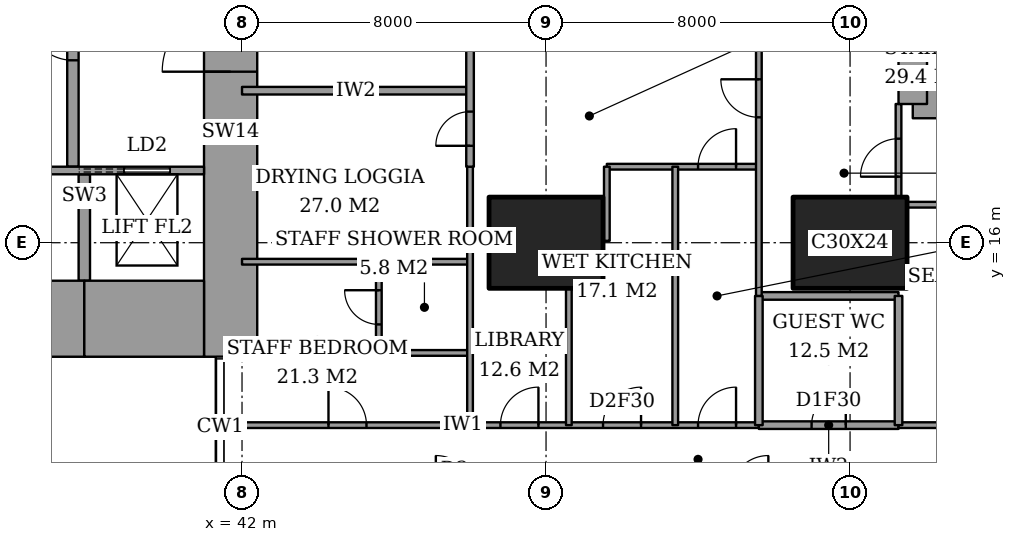
"""IFC4 building model, lengths in metres.
Left out: names, types, materials, properties, quantities, classifications, styles, units other than length and angle.
Written with IfcOpenShell. Run it as: python <this file> out.ifc"""

import sys

from ifc_helpers import new_model, si_unit, direction, frame, frame_2d, origin, origin_2d, place, context, subcontext, project, spatial, rectangle, extrude, element, fill, save


model = new_model("IFC4")
c1 = context("Model", 3, precision=1e-05, world=origin(), true_north=direction((0.0, 1.0)))
c2 = subcontext(c1, "Body", "Model", "MODEL_VIEW")
j1 = project(units=[si_unit("LENGTHUNIT", "METRE"), si_unit("PLANEANGLEUNIT", "RADIAN")], contexts=[c1])
p1 = place(None, origin())
s1 = spatial("IfcSite", under=j1, at=p1, CompositionType="ELEMENT")
p2 = place(p1, origin())
s2 = spatial("IfcBuilding", under=s1, at=p2, CompositionType="ELEMENT")
p3 = place(p2, frame((0.0, 0.0, 189.4)))
s3 = spatial("IfcBuildingStorey", under=s2, at=p3, CompositionType="ELEMENT", Elevation=189.4)
for number, where, z_axis, x_axis in (
    (1, (50.0, 16.0, 0.0), (0.0, 0.0, 1.0), (1.0, 0.0, 0.0)),
    (2, (58.0, 16.0, 0.0), (0.0, 0.0, 1.0), (1.0, 0.0, 0.0)),
):
    element("IfcColumn", number, at=place(p3, frame(where, z_axis=z_axis, x_axis=x_axis)), inside=s3, PredefinedType="COLUMN", context=c2, shape_type="SweptSolid", body=[
        extrude(rectangle(XDim=3.0, YDim=2.4, at=origin_2d()), origin(), (0.0, 0.0, 1.0), 3.6),
    ])
p4 = place(p3, frame((28.15, 14.0, 0.0), z_axis=(0.0, 0.0, 1.0), x_axis=(1.0, 0.0, 0.0)))
e3 = element("IfcWall", 3, at=p4, inside=s3, PredefinedType="SHEAR", context=c2, shape_type="SweptSolid", body=[
    extrude(rectangle(XDim=9.7, YDim=2.0, at=frame_2d((4.85, 0.0))), origin(), (0.0, 0.0, 1.0), 3.6),
])
p5 = place(p3, frame((37.85, 14.0, 0.0), z_axis=(0.0, 0.0, 1.0), x_axis=(1.0, 0.0, 0.0)))
e4 = element("IfcWall", 4, at=p5, inside=s3, PredefinedType="SHEAR", context=c2, shape_type="SweptSolid", body=[
    extrude(rectangle(XDim=3.15, YDim=2.0, at=frame_2d((1.575, 0.0))), origin(), (0.0, 0.0, 1.0), 3.6),
])
p6 = place(p3, frame((41.7, 13.0, 0.0), z_axis=(0.0, 0.0, 1.0), x_axis=(0.0, 1.0, 0.0)))
e5 = element("IfcWall", 5, at=p6, inside=s3, PredefinedType="SHEAR", context=c2, shape_type="SweptSolid", body=[
    extrude(rectangle(XDim=11.85, YDim=1.4, at=frame_2d((5.925, 0.0))), origin(), (0.0, 0.0, 1.0), 3.6),
])
p7 = place(p6, frame((7.5, 0.0, 0.0)))
e6 = element("IfcOpeningElement", 6, at=p7, cuts=e5, PredefinedType="OPENING", context=c2, shape_type="SweptSolid", body=[
    extrude(rectangle(XDim=1.8, YDim=2.4, at=frame_2d((0.9, 1.2))), frame((0.0, 0.71, 0.0), z_axis=(0.0, -1.0, 0.0), x_axis=(1.0, 0.0, 0.0)), (0.0, 0.0, 1.0), 1.42),
])
p8 = place(p3, frame((37.55, 18.0, 0.0), z_axis=(0.0, 0.0, 1.0), x_axis=(0.0, 1.0, 0.0)))
e7 = element("IfcWall", 7, at=p8, inside=s3, PredefinedType="PARTITIONING", context=c2, shape_type="SweptSolid", body=[
    extrude(rectangle(XDim=6.7, YDim=0.3, at=frame_2d((3.35, 0.0))), origin(), (0.0, 0.0, 1.0), 3.6),
])
p9 = place(p8, frame((2.8, 0.0, 0.0)))
e8 = element("IfcOpeningElement", 8, at=p9, cuts=e7, PredefinedType="OPENING", context=c2, shape_type="SweptSolid", body=[
    extrude(rectangle(XDim=1.2, YDim=2.1, at=frame_2d((0.6, 1.05))), frame((0.0, 0.16, 0.0), z_axis=(0.0, -1.0, 0.0), x_axis=(1.0, 0.0, 0.0)), (0.0, 0.0, 1.0), 0.32),
])
p10 = place(p3, frame((59.65, 19.65, 0.0), z_axis=(0.0, 0.0, 1.0), x_axis=(1.0, 0.0, 0.0)))
e9 = element("IfcWall", 9, at=p10, inside=s3, PredefinedType="SHEAR", context=c2, shape_type="SweptSolid", body=[
    extrude(rectangle(XDim=4.45, YDim=0.75, at=frame_2d((2.225, 0.0))), origin(), (0.0, 0.0, 1.0), 3.6),
])
p11 = place(p3, frame((59.65, 28.35, 0.0), z_axis=(0.0, 0.0, 1.0), x_axis=(0.0, -1.0, 0.0)))
e10 = element("IfcWall", 10, at=p11, inside=s3, PredefinedType="SHEAR", context=c2, shape_type="SweptSolid", body=[
    extrude(rectangle(XDim=8.7, YDim=0.75, at=frame_2d((4.35, 0.0))), origin(), (0.0, 0.0, 1.0), 3.6),
])
p12 = place(p11, frame((0.975, 0.0, 0.0)))
e11 = element("IfcOpeningElement", 11, at=p12, cuts=e10, PredefinedType="OPENING", context=c2, shape_type="SweptSolid", body=[
    extrude(rectangle(XDim=1.0, YDim=2.1, at=frame_2d((0.5, 1.05))), frame((0.0, 0.385, 0.0), z_axis=(0.0, -1.0, 0.0), x_axis=(1.0, 0.0, 0.0)), (0.0, 0.0, 1.0), 0.77),
])
p13 = place(p3, frame((55.6, 11.2, 0.0), z_axis=(0.0, 0.0, 1.0), x_axis=(1.0, 0.0, 0.0)))
e12 = element("IfcWall", 12, at=p13, inside=s3, PredefinedType="PARTITIONING", context=c2, shape_type="SweptSolid", body=[
    extrude(rectangle(XDim=3.675, YDim=0.2, at=frame_2d((1.837, 0.0))), origin(), (0.0, 0.0, 1.0), 3.35),
])
p14 = place(p13, frame((1.387, 0.0, 0.0)))
e13 = element("IfcOpeningElement", 13, at=p14, cuts=e12, PredefinedType="OPENING", context=c2, shape_type="SweptSolid", body=[
    extrude(rectangle(XDim=0.9, YDim=2.1, at=frame_2d((0.45, 1.05))), frame((0.0, 0.11, 0.0), z_axis=(0.0, -1.0, 0.0), x_axis=(1.0, 0.0, 0.0)), (0.0, 0.0, 1.0), 0.22),
])
p15 = place(p3, frame((41.439, 11.2, 0.0), z_axis=(0.0, 0.0, 1.0), x_axis=(1.0, 0.0, 0.0)))
e14 = element("IfcWall", 14, at=p15, inside=s3, PredefinedType="PARTITIONING", context=c2, shape_type="SweptSolid", body=[
    extrude(rectangle(XDim=14.161, YDim=0.15, at=frame_2d((7.081, 0.0))), origin(), (0.0, 0.0, 1.0), 3.35),
])
p16 = place(p15, frame((12.561, 0.0, 0.0)))
e15 = element("IfcOpeningElement", 15, at=p16, cuts=e14, PredefinedType="OPENING", context=c2, shape_type="SweptSolid", body=[
    extrude(rectangle(XDim=1.0, YDim=2.1, at=frame_2d((0.5, 1.05))), frame((0.0, 0.085, 0.0), z_axis=(0.0, -1.0, 0.0), x_axis=(1.0, 0.0, 0.0)), (0.0, 0.0, 1.0), 0.17),
])
p17 = place(p15, frame((10.061, 0.0, 0.0)))
e16 = element("IfcOpeningElement", 16, at=p17, cuts=e14, PredefinedType="OPENING", context=c2, shape_type="SweptSolid", body=[
    extrude(rectangle(XDim=1.0, YDim=2.1, at=frame_2d((0.5, 1.05))), frame((0.0, 0.085, 0.0), z_axis=(0.0, -1.0, 0.0), x_axis=(1.0, 0.0, 0.0)), (0.0, 0.0, 1.0), 0.17),
])
p18 = place(p15, frame((7.361, 0.0, 0.0)))
e17 = element("IfcOpeningElement", 17, at=p18, cuts=e14, PredefinedType="OPENING", context=c2, shape_type="SweptSolid", body=[
    extrude(rectangle(XDim=1.0, YDim=2.1, at=frame_2d((0.5, 1.05))), frame((0.0, 0.085, 0.0), z_axis=(0.0, -1.0, 0.0), x_axis=(1.0, 0.0, 0.0)), (0.0, 0.0, 1.0), 0.17),
])
p19 = place(p15, frame((2.836, 0.0, 0.0)))
e18 = element("IfcOpeningElement", 18, at=p19, cuts=e14, PredefinedType="OPENING", context=c2, shape_type="SweptSolid", body=[
    extrude(rectangle(XDim=1.0, YDim=2.1, at=frame_2d((0.5, 1.05))), frame((0.0, 0.085, 0.0), z_axis=(0.0, -1.0, 0.0), x_axis=(1.0, 0.0, 0.0)), (0.0, 0.0, 1.0), 0.17),
])
p20 = place(p3, frame((59.275, 11.2, 0.0), z_axis=(0.0, 0.0, 1.0), x_axis=(1.0, 0.0, 0.0)))
e19 = element("IfcWall", 19, at=p20, inside=s3, PredefinedType="PARTITIONING", context=c2, shape_type="SweptSolid", body=[
    extrude(rectangle(XDim=7.175, YDim=0.15, at=frame_2d((3.587, 0.0))), origin(), (0.0, 0.0, 1.0), 3.35),
])
p21 = place(p20, frame((3.087, 0.0, 0.0)))
e20 = element("IfcOpeningElement", 20, at=p21, cuts=e19, PredefinedType="OPENING", context=c2, shape_type="SweptSolid", body=[
    extrude(rectangle(XDim=1.0, YDim=2.1, at=frame_2d((0.5, 1.05))), frame((0.0, 0.085, 0.0), z_axis=(0.0, -1.0, 0.0), x_axis=(1.0, 0.0, 0.0)), (0.0, 0.0, 1.0), 0.17),
])
p22 = place(p3, frame((45.6, 13.1, 0.0), z_axis=(0.0, 0.0, 1.0), x_axis=(1.0, 0.0, 0.0)))
e21 = element("IfcWall", 21, at=p22, inside=s3, PredefinedType="PARTITIONING", context=c2, shape_type="SweptSolid", body=[
    extrude(rectangle(XDim=2.4, YDim=0.15, at=frame_2d((1.2, 0.0))), origin(), (0.0, 0.0, 1.0), 3.35),
])
p23 = place(p3, frame((55.6, 14.6, 0.0), z_axis=(0.0, 0.0, 1.0), x_axis=(1.0, 0.0, 0.0)))
e22 = element("IfcWall", 22, at=p23, inside=s3, PredefinedType="PARTITIONING", context=c2, shape_type="SweptSolid", body=[
    extrude(rectangle(XDim=3.675, YDim=0.2, at=frame_2d((1.837, 0.0))), origin(), (0.0, 0.0, 1.0), 3.35),
])
p24 = place(p3, frame((42.0, 15.5, 0.0), z_axis=(0.0, 0.0, 1.0), x_axis=(1.0, 0.0, 0.0)))
e23 = element("IfcWall", 23, at=p24, inside=s3, PredefinedType="PARTITIONING", context=c2, shape_type="SweptSolid", body=[
    extrude(rectangle(XDim=6.0, YDim=0.15, at=frame_2d((3.0, 0.0))), origin(), (0.0, 0.0, 1.0), 3.35),
])
p25 = place(p3, frame((48.0, 16.05, 0.0), z_axis=(0.0, 0.0, 1.0), x_axis=(1.0, 0.0, 0.0)))
e24 = element("IfcWall", 24, at=p25, inside=s3, PredefinedType="PARTITIONING", context=c2, shape_type="SweptSolid", body=[
    extrude(rectangle(XDim=0.5, YDim=0.15, at=frame_2d((0.25, 0.0))), origin(), (0.0, 0.0, 1.0), 2.634),
])
p26 = place(p3, frame((59.5, 17.0, 0.0), z_axis=(0.0, 0.0, 1.0), x_axis=(1.0, 0.0, 0.0)))
e25 = element("IfcWall", 25, at=p26, inside=s3, PredefinedType="PARTITIONING", context=c2, shape_type="SweptSolid", body=[
    extrude(rectangle(XDim=6.95, YDim=0.15, at=frame_2d((3.475, 0.0))), origin(), (0.0, 0.0, 1.0), 3.35),
])
p27 = place(p3, frame((51.6, 18.0, 0.0), z_axis=(0.0, 0.0, 1.0), x_axis=(1.0, 0.0, 0.0)))
e26 = element("IfcWall", 26, at=p27, inside=s3, PredefinedType="PARTITIONING", context=c2, shape_type="SweptSolid", body=[
    extrude(rectangle(XDim=4.0, YDim=0.15, at=frame_2d((2.0, 0.0))), origin(), (0.0, 0.0, 1.0), 3.35),
])
p28 = place(p27, frame((2.4, 0.0, 0.0)))
e27 = element("IfcOpeningElement", 27, at=p28, cuts=e26, PredefinedType="OPENING", context=c2, shape_type="SweptSolid", body=[
    extrude(rectangle(XDim=1.0, YDim=2.1, at=frame_2d((0.5, 1.05))), frame((0.0, 0.085, 0.0), z_axis=(0.0, -1.0, 0.0), x_axis=(1.0, 0.0, 0.0)), (0.0, 0.0, 1.0), 0.17),
])
p29 = place(p3, frame((42.0, 20.0, 0.0), z_axis=(0.0, 0.0, 1.0), x_axis=(1.0, 0.0, 0.0)))
e28 = element("IfcWall", 28, at=p29, inside=s3, PredefinedType="PARTITIONING", context=c2, shape_type="SweptSolid", body=[
    extrude(rectangle(XDim=6.0, YDim=0.2, at=frame_2d((3.0, 0.0))), origin(), (0.0, 0.0, 1.0), 3.35),
])
p30 = place(p3, frame((45.6, 13.1, 0.0), z_axis=(0.0, 0.0, 1.0), x_axis=(0.0, 1.0, 0.0)))
e29 = element("IfcWall", 29, at=p30, inside=s3, PredefinedType="PARTITIONING", context=c2, shape_type="SweptSolid", body=[
    extrude(rectangle(XDim=2.4, YDim=0.15, at=frame_2d((1.2, 0.0))), origin(), (0.0, 0.0, 1.0), 3.35),
])
p31 = place(p30, frame((0.75, 0.0, 0.0)))
e30 = element("IfcOpeningElement", 30, at=p31, cuts=e29, PredefinedType="OPENING", context=c2, shape_type="SweptSolid", body=[
    extrude(rectangle(XDim=0.9, YDim=2.1, at=frame_2d((0.45, 1.05))), frame((0.0, 0.085, 0.0), z_axis=(0.0, -1.0, 0.0), x_axis=(1.0, 0.0, 0.0)), (0.0, 0.0, 1.0), 0.17),
])
p32 = place(p3, frame((48.0, 18.0, 0.0), z_axis=(0.0, 0.0, 1.0), x_axis=(0.0, 1.0, 0.0)))
e31 = element("IfcWall", 31, at=p32, inside=s3, PredefinedType="PARTITIONING", context=c2, shape_type="SweptSolid", body=[
    extrude(rectangle(XDim=6.0, YDim=0.2, at=frame_2d((3.0, 0.0))), origin(), (0.0, 0.0, 1.0), 3.35),
])
p33 = place(p32, frame((3.4, 0.0, 0.0)))
e32 = element("IfcOpeningElement", 32, at=p33, cuts=e31, PredefinedType="OPENING", context=c2, shape_type="SweptSolid", body=[
    extrude(rectangle(XDim=1.2, YDim=2.4, at=frame_2d((0.6, 1.2))), frame((0.0, 0.11, 0.0), z_axis=(0.0, -1.0, 0.0), x_axis=(1.0, 0.0, 0.0)), (0.0, 0.0, 1.0), 0.22),
])
p34 = place(p32, frame((0.55, 0.0, 0.0)))
e33 = element("IfcOpeningElement", 33, at=p34, cuts=e31, PredefinedType="OPENING", context=c2, shape_type="SweptSolid", body=[
    extrude(rectangle(XDim=0.9, YDim=2.1, at=frame_2d((0.45, 1.05))), frame((0.0, 0.11, 0.0), z_axis=(0.0, -1.0, 0.0), x_axis=(1.0, 0.0, 0.0)), (0.0, 0.0, 1.0), 0.22),
])
p35 = place(p3, frame((48.0, 11.2, 0.0), z_axis=(0.0, 0.0, 1.0), x_axis=(0.0, 1.0, 0.0)))
e34 = element("IfcWall", 34, at=p35, inside=s3, PredefinedType="PARTITIONING", context=c2, shape_type="SweptSolid", body=[
    extrude(rectangle(XDim=6.8, YDim=0.15, at=frame_2d((3.4, 0.0))), origin(), (0.0, 0.0, 1.0), 3.35),
])
p36 = place(p3, frame((50.6, 11.2, 0.0), z_axis=(0.0, 0.0, 1.0), x_axis=(0.0, 1.0, 0.0)))
e35 = element("IfcWall", 35, at=p36, inside=s3, PredefinedType="PARTITIONING", context=c2, shape_type="SweptSolid", body=[
    extrude(rectangle(XDim=3.6, YDim=0.15, at=frame_2d((1.8, 0.0))), origin(), (0.0, 0.0, 1.0), 3.35),
])
p37 = place(p3, frame((51.6, 16.05, 0.0), z_axis=(0.0, 0.0, 1.0), x_axis=(0.0, 1.0, 0.0)))
e36 = element("IfcWall", 36, at=p37, inside=s3, PredefinedType="PARTITIONING", context=c2, shape_type="SweptSolid", body=[
    extrude(rectangle(XDim=1.95, YDim=0.15, at=frame_2d((0.975, 0.0))), origin(), (0.0, 0.0, 1.0), 3.35),
])
p38 = place(p3, frame((53.4, 11.2, 0.0), z_axis=(0.0, 0.0, 1.0), x_axis=(0.0, 1.0, 0.0)))
e37 = element("IfcWall", 37, at=p38, inside=s3, PredefinedType="PARTITIONING", context=c2, shape_type="SweptSolid", body=[
    extrude(rectangle(XDim=6.8, YDim=0.15, at=frame_2d((3.4, 0.0))), origin(), (0.0, 0.0, 1.0), 3.35),
])
p39 = place(p3, frame((55.6, 11.2, 0.0), z_axis=(0.0, 0.0, 1.0), x_axis=(0.0, 1.0, 0.0)))
e38 = element("IfcWall", 38, at=p39, inside=s3, PredefinedType="PARTITIONING", context=c2, shape_type="SweptSolid", body=[
    extrude(rectangle(XDim=3.4, YDim=0.2, at=frame_2d((1.7, 0.0))), origin(), (0.0, 0.0, 1.0), 3.35),
])
p40 = place(p3, frame((55.6, 14.6, 0.0), z_axis=(0.0, 0.0, 1.0), x_axis=(0.0, 1.0, 0.0)))
e39 = element("IfcWall", 39, at=p40, inside=s3, PredefinedType="PARTITIONING", context=c2, shape_type="SweptSolid", body=[
    extrude(rectangle(XDim=7.0, YDim=0.15, at=frame_2d((3.5, 0.0))), origin(), (0.0, 0.0, 1.0), 3.35),
])
p41 = place(p40, frame((4.7, 0.0, 0.0)))
e40 = element("IfcOpeningElement", 40, at=p41, cuts=e39, PredefinedType="OPENING", context=c2, shape_type="SweptSolid", body=[
    extrude(rectangle(XDim=1.0, YDim=2.1, at=frame_2d((0.5, 1.05))), frame((0.0, 0.085, 0.0), z_axis=(0.0, -1.0, 0.0), x_axis=(1.0, 0.0, 0.0)), (0.0, 0.0, 1.0), 0.17),
])
p42 = place(p3, frame((59.275, 11.2, 0.0), z_axis=(0.0, 0.0, 1.0), x_axis=(0.0, 1.0, 0.0)))
e41 = element("IfcWall", 41, at=p42, inside=s3, PredefinedType="PARTITIONING", context=c2, shape_type="SweptSolid", body=[
    extrude(rectangle(XDim=3.4, YDim=0.2, at=frame_2d((1.7, 0.0))), origin(), (0.0, 0.0, 1.0), 3.35),
])
p43 = place(p3, frame((59.275, 17.2, 0.0), z_axis=(0.0, 0.0, 1.0), x_axis=(0.0, 1.0, 0.0)))
e42 = element("IfcWall", 42, at=p43, inside=s3, PredefinedType="PARTITIONING", context=c2, shape_type="SweptSolid", body=[
    extrude(rectangle(XDim=2.45, YDim=0.15, at=frame_2d((1.225, 0.0))), origin(), (0.0, 0.0, 1.0), 3.35),
])
p44 = place(p43, frame((0.538, 0.0, 0.0)))
e43 = element("IfcOpeningElement", 43, at=p44, cuts=e42, PredefinedType="OPENING", context=c2, shape_type="SweptSolid", body=[
    extrude(rectangle(XDim=1.0, YDim=2.1, at=frame_2d((0.5, 1.05))), frame((0.0, 0.085, 0.0), z_axis=(0.0, -1.0, 0.0), x_axis=(1.0, 0.0, 0.0)), (0.0, 0.0, 1.0), 0.17),
])
p45 = place(p3, frame((28.3, 17.9, 0.0), z_axis=(0.0, 0.0, 1.0), x_axis=(1.0, 0.0, 0.0)))
e44 = element("IfcWall", 44, at=p45, inside=s3, PredefinedType="PARTITIONING", context=c2, shape_type="SweptSolid", body=[
    extrude(rectangle(XDim=12.7, YDim=0.2, at=frame_2d((6.35, 0.0))), origin(), (0.0, 0.0, 1.0), 3.6),
])
p46 = place(p45, frame((1.05, 0.0, 0.0)))
e45 = element("IfcOpeningElement", 45, at=p46, cuts=e44, PredefinedType="OPENING", context=c2, shape_type="SweptSolid", body=[
    extrude(rectangle(XDim=0.9, YDim=2.1, at=frame_2d((0.45, 1.05))), frame((0.0, 0.11, 0.0), z_axis=(0.0, -1.0, 0.0), x_axis=(1.0, 0.0, 0.0)), (0.0, 0.0, 1.0), 0.22),
])
p47 = place(p45, frame((10.6, 0.0, 0.0)))
e46 = element("IfcOpeningElement", 46, at=p47, cuts=e44, PredefinedType="OPENING", context=c2, shape_type="SweptSolid", body=[
    extrude(rectangle(XDim=1.2, YDim=2.1, at=frame_2d((0.6, 1.05))), frame((0.0, 0.11, 0.0), z_axis=(0.0, -1.0, 0.0), x_axis=(1.0, 0.0, 0.0)), (0.0, 0.0, 1.0), 0.22),
])
p48 = place(p3, frame((37.85, 15.0, 0.0), z_axis=(0.0, 0.0, 1.0), x_axis=(0.0, 1.0, 0.0)))
e47 = element("IfcWall", 47, at=p48, inside=s3, PredefinedType="SHEAR", context=c2, shape_type="SweptSolid", body=[
    extrude(rectangle(XDim=2.8, YDim=0.3, at=frame_2d((1.4, 0.0))), origin(), (0.0, 0.0, 1.0), 3.6),
])
p49 = place(p16, origin())
e48 = element("IfcDoor", 48, at=p49, inside=s3, OperationType="SINGLE_SWING_LEFT", PredefinedType="DOOR", context=c2, shape_type="SweptSolid", body=[
    extrude(rectangle(XDim=1.0, YDim=2.1, at=frame_2d((0.5, 1.05))), frame((0.0, 0.025, 0.0), z_axis=(0.0, -1.0, 0.0), x_axis=(1.0, 0.0, 0.0)), (0.0, 0.0, 1.0), 0.05),
])
fill(e15, e48)
p50 = place(p44, origin())
e49 = element("IfcDoor", 49, at=p50, inside=s3, OperationType="SINGLE_SWING_RIGHT", PredefinedType="DOOR", context=c2, shape_type="SweptSolid", body=[
    extrude(rectangle(XDim=1.0, YDim=2.1, at=frame_2d((0.5, 1.05))), frame((0.0, 0.025, 0.0), z_axis=(0.0, -1.0, 0.0), x_axis=(1.0, 0.0, 0.0)), (0.0, 0.0, 1.0), 0.05),
])
fill(e43, e49)
p51 = place(p14, origin())
e50 = element("IfcDoor", 50, at=p51, inside=s3, OperationType="SINGLE_SWING_LEFT", PredefinedType="DOOR", context=c2, shape_type="SweptSolid", body=[
    extrude(rectangle(XDim=0.9, YDim=2.1, at=frame_2d((0.45, 1.05))), frame((0.0, 0.025, 0.0), z_axis=(0.0, -1.0, 0.0), x_axis=(1.0, 0.0, 0.0)), (0.0, 0.0, 1.0), 0.05),
])
fill(e13, e50)
p52 = place(p41, origin())
e51 = element("IfcDoor", 51, at=p52, inside=s3, OperationType="SINGLE_SWING_LEFT", PredefinedType="DOOR", context=c2, shape_type="SweptSolid", body=[
    extrude(rectangle(XDim=1.0, YDim=2.1, at=frame_2d((0.5, 1.05))), frame((0.0, 0.025, 0.0), z_axis=(0.0, -1.0, 0.0), x_axis=(1.0, 0.0, 0.0)), (0.0, 0.0, 1.0), 0.05),
])
fill(e40, e51)
p53 = place(p28, origin())
e52 = element("IfcDoor", 52, at=p53, inside=s3, OperationType="SINGLE_SWING_LEFT", PredefinedType="DOOR", context=c2, shape_type="SweptSolid", body=[
    extrude(rectangle(XDim=1.0, YDim=2.1, at=frame_2d((0.5, 1.05))), frame((0.0, 0.025, 0.0), z_axis=(0.0, -1.0, 0.0), x_axis=(1.0, 0.0, 0.0)), (0.0, 0.0, 1.0), 0.05),
])
fill(e27, e52)
p54 = place(p17, origin())
e53 = element("IfcDoor", 53, at=p54, inside=s3, OperationType="SINGLE_SWING_LEFT", PredefinedType="DOOR", context=c2, shape_type="SweptSolid", body=[
    extrude(rectangle(XDim=1.0, YDim=2.1, at=frame_2d((0.5, 1.05))), frame((0.0, 0.025, 0.0), z_axis=(0.0, -1.0, 0.0), x_axis=(1.0, 0.0, 0.0)), (0.0, 0.0, 1.0), 0.05),
])
fill(e16, e53)
p55 = place(p18, origin())
e54 = element("IfcDoor", 54, at=p55, inside=s3, OperationType="SINGLE_SWING_LEFT", PredefinedType="DOOR", context=c2, shape_type="SweptSolid", body=[
    extrude(rectangle(XDim=1.0, YDim=2.1, at=frame_2d((0.5, 1.05))), frame((0.0, 0.025, 0.0), z_axis=(0.0, -1.0, 0.0), x_axis=(1.0, 0.0, 0.0)), (0.0, 0.0, 1.0), 0.05),
])
fill(e17, e54)
p56 = place(p31, origin())
e55 = element("IfcDoor", 55, at=p56, inside=s3, OperationType="SINGLE_SWING_LEFT", PredefinedType="DOOR", context=c2, shape_type="SweptSolid", body=[
    extrude(rectangle(XDim=0.9, YDim=2.1, at=frame_2d((0.45, 1.05))), frame((0.0, 0.025, 0.0), z_axis=(0.0, -1.0, 0.0), x_axis=(1.0, 0.0, 0.0)), (0.0, 0.0, 1.0), 0.05),
])
fill(e30, e55)
p57 = place(p19, origin())
e56 = element("IfcDoor", 56, at=p57, inside=s3, OperationType="SINGLE_SWING_RIGHT", PredefinedType="DOOR", context=c2, shape_type="SweptSolid", body=[
    extrude(rectangle(XDim=1.0, YDim=2.1, at=frame_2d((0.5, 1.05))), frame((0.0, 0.025, 0.0), z_axis=(0.0, -1.0, 0.0), x_axis=(1.0, 0.0, 0.0)), (0.0, 0.0, 1.0), 0.05),
])
fill(e18, e56)
p58 = place(p34, origin())
e57 = element("IfcDoor", 57, at=p58, inside=s3, OperationType="SINGLE_SWING_RIGHT", PredefinedType="DOOR", context=c2, shape_type="SweptSolid", body=[
    extrude(rectangle(XDim=0.9, YDim=2.1, at=frame_2d((0.45, 1.05))), frame((0.0, 0.025, 0.0), z_axis=(0.0, -1.0, 0.0), x_axis=(1.0, 0.0, 0.0)), (0.0, 0.0, 1.0), 0.05),
])
fill(e33, e57)
p59 = place(p9, origin())
e58 = element("IfcDoor", 58, at=p59, inside=s3, OperationType="SINGLE_SWING_LEFT", PredefinedType="DOOR", context=c2, shape_type="SweptSolid", body=[
    extrude(rectangle(XDim=1.2, YDim=2.1, at=frame_2d((0.6, 1.05))), frame((0.0, 0.025, 0.0), z_axis=(0.0, -1.0, 0.0), x_axis=(1.0, 0.0, 0.0)), (0.0, 0.0, 1.0), 0.05),
])
fill(e8, e58)
p60 = place(p7, origin())
e59 = element("IfcDoor", 59, at=p60, inside=s3, OperationType="DOUBLE_DOOR_DOUBLE_SWING", PredefinedType="DOOR", context=c2, shape_type="SweptSolid", body=[
    extrude(rectangle(XDim=1.8, YDim=2.4, at=frame_2d((0.9, 1.2))), frame((0.0, 0.025, 0.0), z_axis=(0.0, -1.0, 0.0), x_axis=(1.0, 0.0, 0.0)), (0.0, 0.0, 1.0), 0.05),
])
fill(e6, e59)
p61 = place(p47, origin())
e60 = element("IfcDoor", 60, at=p61, inside=s3, OperationType="SLIDING_TO_LEFT", PredefinedType="DOOR", context=c2, shape_type="SweptSolid", body=[
    extrude(rectangle(XDim=1.2, YDim=2.1, at=frame_2d((0.6, 1.05))), frame((0.0, 0.025, 0.0), z_axis=(0.0, -1.0, 0.0), x_axis=(1.0, 0.0, 0.0)), (0.0, 0.0, 1.0), 0.05),
])
fill(e46, e60)
save(model, sys.argv[1])
